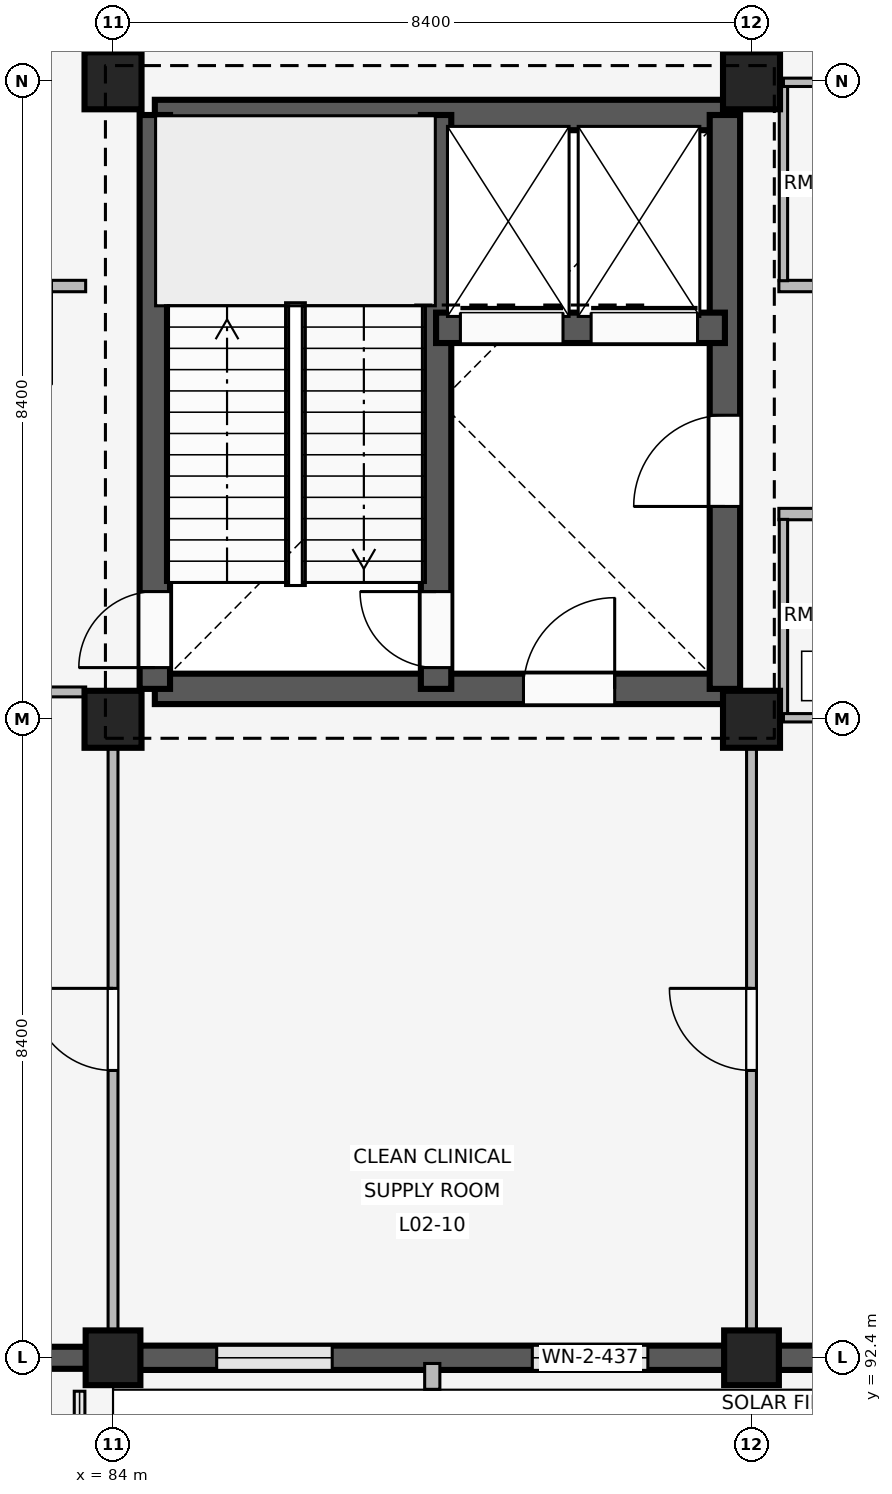
"""IFC4 building model, lengths in metres.
Left out: names, types, materials, properties, quantities, classifications, styles, units other than length and angle.
Written with IfcOpenShell. Run it as: python <this file> out.ifc"""

import sys

from ifc_helpers import new_model, si_unit, direction, frame, frame_2d, origin, origin_2d, place, context, subcontext, project, spatial, rectangle, extrude, element, fill, save


model = new_model("IFC4")
c1 = context("Model", 3, precision=1e-05, world=origin(), true_north=direction((0.0, 1.0)))
c2 = subcontext(c1, "Body", "Model", "MODEL_VIEW")
j1 = project(units=[si_unit("LENGTHUNIT", "METRE"), si_unit("PLANEANGLEUNIT", "RADIAN")], contexts=[c1])
p1 = place(None, origin())
s1 = spatial("IfcSite", under=j1, at=p1, CompositionType="ELEMENT")
p2 = place(p1, origin())
s2 = spatial("IfcBuilding", under=s1, at=p2, CompositionType="ELEMENT")
p3 = place(p2, frame((0.0, 0.0, 8.1)))
s3 = spatial("IfcBuildingStorey", under=s2, at=p3, CompositionType="ELEMENT", Elevation=8.1)
p4 = place(p3, frame((84.0, 92.4, 0.0), z_axis=(0.0, 0.0, 1.0), x_axis=(1.0, 0.0, 0.0)))
e1 = element("IfcColumn", 1, at=p4, inside=s3, PredefinedType="COLUMN", context=c2, shape_type="SweptSolid", body=[
    extrude(rectangle(XDim=0.72, YDim=0.72, at=origin_2d()), origin(), (0.0, 0.0, 1.0), 4.8),
])
for number, where, z_axis, x_axis in (
    (2, (84.0, 100.8, 0.0), (0.0, 0.0, 1.0), (1.0, 0.0, 0.0)),
    (3, (84.0, 109.2, 0.0), (0.0, 0.0, 1.0), (1.0, 0.0, 0.0)),
):
    element("IfcColumn", number, at=place(p3, frame(where, z_axis=z_axis, x_axis=x_axis)), inside=s3, PredefinedType="COLUMN", context=c2, shape_type="SweptSolid", body=[
        extrude(rectangle(XDim=0.75, YDim=0.75, at=origin_2d()), origin(), (0.0, 0.0, 1.0), 4.8),
    ])
p5 = place(p3, frame((92.4, 92.4, 0.0), z_axis=(0.0, 0.0, 1.0), x_axis=(1.0, 0.0, 0.0)))
e4 = element("IfcColumn", 4, at=p5, inside=s3, PredefinedType="COLUMN", context=c2, shape_type="SweptSolid", body=[
    extrude(rectangle(XDim=0.72, YDim=0.72, at=origin_2d()), origin(), (0.0, 0.0, 1.0), 4.8),
])
for number, where, z_axis, x_axis in (
    (5, (92.4, 100.8, 0.0), (0.0, 0.0, 1.0), (1.0, 0.0, 0.0)),
    (6, (92.4, 109.2, 0.0), (0.0, 0.0, 1.0), (1.0, 0.0, 0.0)),
):
    element("IfcColumn", number, at=place(p3, frame(where, z_axis=z_axis, x_axis=x_axis)), inside=s3, PredefinedType="COLUMN", context=c2, shape_type="SweptSolid", body=[
        extrude(rectangle(XDim=0.75, YDim=0.75, at=origin_2d()), origin(), (0.0, 0.0, 1.0), 4.8),
    ])
p6 = place(p3, frame((83.645, 92.4, 0.0), z_axis=(0.0, 0.0, 1.0), x_axis=(-1.0, 0.0, 0.0)))
e7 = element("IfcWall", 7, at=p6, inside=s3, PredefinedType="SOLIDWALL", context=c2, shape_type="SweptSolid", body=[
    extrude(rectangle(XDim=7.69, YDim=0.29, at=frame_2d((3.845, 0.0))), origin(), (0.0, 0.0, 1.0), 3.86),
])
p7 = place(p6, frame((2.895, 0.0, 0.0)))
e8 = element("IfcOpeningElement", 8, at=p7, cuts=e7, PredefinedType="OPENING", context=c2, shape_type="SweptSolid", body=[
    extrude(rectangle(XDim=1.9, YDim=2.4, at=frame_2d((0.95, 1.2))), frame((0.0, 0.155, 0.0), z_axis=(0.0, -1.0, 0.0), x_axis=(1.0, 0.0, 0.0)), (0.0, 0.0, 1.0), 0.31),
])
p8 = place(p3, frame((92.045, 92.4, 0.0), z_axis=(0.0, 0.0, 1.0), x_axis=(-1.0, 0.0, 0.0)))
e9 = element("IfcWall", 9, at=p8, inside=s3, PredefinedType="SOLIDWALL", context=c2, shape_type="SweptSolid", body=[
    extrude(rectangle(XDim=7.69, YDim=0.32, at=frame_2d((3.845, 0.0))), origin(), (0.0, 0.0, 1.0), 3.86),
])
p9 = place(p8, frame((1.009, 0.0, 0.85)))
e10 = element("IfcOpeningElement", 10, at=p9, cuts=e9, PredefinedType="OPENING", context=c2, shape_type="SweptSolid", body=[
    extrude(rectangle(XDim=1.52, YDim=1.65, at=frame_2d((0.76, 0.825))), frame((0.0, 0.17, 0.0), z_axis=(0.0, -1.0, 0.0), x_axis=(1.0, 0.0, 0.0)), (0.0, 0.0, 1.0), 0.34),
])
p10 = place(p8, frame((5.161, 0.0, 0.85)))
e11 = element("IfcOpeningElement", 11, at=p10, cuts=e9, PredefinedType="OPENING", context=c2, shape_type="SweptSolid", body=[
    extrude(rectangle(XDim=1.52, YDim=1.65, at=frame_2d((0.76, 0.825))), frame((0.0, 0.17, 0.0), z_axis=(0.0, -1.0, 0.0), x_axis=(1.0, 0.0, 0.0)), (0.0, 0.0, 1.0), 0.34),
])
p11 = place(p3, frame((88.2, 92.325, 0.0), z_axis=(0.0, 0.0, 1.0), x_axis=(0.0, -1.0, 0.0)))
e12 = element("IfcWall", 12, at=p11, inside=s3, PredefinedType="ELEMENTEDWALL", context=c2, shape_type="SweptSolid", body=[
    extrude(rectangle(XDim=0.34, YDim=0.2, at=frame_2d((0.17, 0.0))), origin(), (0.0, 0.0, 1.0), 3.84),
])
p12 = place(p3, frame((100.445, 92.4, 0.0), z_axis=(0.0, 0.0, 1.0), x_axis=(-1.0, 0.0, 0.0)))
e13 = element("IfcWall", 13, at=p12, inside=s3, PredefinedType="SOLIDWALL", context=c2, shape_type="SweptSolid", body=[
    extrude(rectangle(XDim=7.69, YDim=0.32, at=frame_2d((3.845, 0.0))), origin(), (0.0, 0.0, 1.0), 3.86),
])
p13 = place(p12, frame((1.094, 0.0, 0.85)))
e14 = element("IfcOpeningElement", 14, at=p13, cuts=e13, PredefinedType="OPENING", context=c2, shape_type="SweptSolid", body=[
    extrude(rectangle(XDim=1.35, YDim=1.55, at=frame_2d((0.675, 0.775))), frame((0.0, 0.17, 0.0), z_axis=(0.0, -1.0, 0.0), x_axis=(1.0, 0.0, 0.0)), (0.0, 0.0, 1.0), 0.34),
])
p14 = place(p12, frame((5.246, 0.0, 0.85)))
e15 = element("IfcOpeningElement", 15, at=p14, cuts=e13, PredefinedType="OPENING", context=c2, shape_type="SweptSolid", body=[
    extrude(rectangle(XDim=1.35, YDim=1.55, at=frame_2d((0.675, 0.775))), frame((0.0, 0.17, 0.0), z_axis=(0.0, -1.0, 0.0), x_axis=(1.0, 0.0, 0.0)), (0.0, 0.0, 1.0), 0.34),
])
p15 = place(p3, frame((84.55, 101.2, 0.0), z_axis=(0.0, 0.0, 1.0), x_axis=(1.0, 0.0, 0.0)))
e16 = element("IfcWall", 16, at=p15, inside=s3, PredefinedType="SHEAR", context=c2, shape_type="SweptSolid", body=[
    extrude(rectangle(XDim=7.5, YDim=0.4, at=frame_2d((3.75, 0.0))), origin(), (0.0, 0.0, 1.0), 4.52),
])
p16 = place(p15, frame((4.85, 0.0, 0.0)))
e17 = element("IfcOpeningElement", 17, at=p16, cuts=e16, PredefinedType="OPENING", context=c2, shape_type="SweptSolid", body=[
    extrude(rectangle(XDim=1.2, YDim=2.2, at=frame_2d((0.6, 1.1))), frame((0.0, 0.21, 0.0), z_axis=(0.0, -1.0, 0.0), x_axis=(1.0, 0.0, 0.0)), (0.0, 0.0, 1.0), 0.42),
])
p17 = place(p3, frame((84.55, 108.75, 0.0), z_axis=(0.0, 0.0, 1.0), x_axis=(1.0, 0.0, 0.0)))
e18 = element("IfcWall", 18, at=p17, inside=s3, PredefinedType="SHEAR", context=c2, shape_type="SweptSolid", body=[
    extrude(rectangle(XDim=7.5, YDim=0.4, at=frame_2d((3.75, 0.0))), origin(), (0.0, 0.0, 1.0), 4.52),
])
p18 = place(p3, frame((84.55, 101.2, 0.0), z_axis=(0.0, 0.0, 1.0), x_axis=(0.0, 1.0, 0.0)))
e19 = element("IfcWall", 19, at=p18, inside=s3, PredefinedType="SHEAR", context=c2, shape_type="SweptSolid", body=[
    extrude(rectangle(XDim=7.55, YDim=0.4, at=frame_2d((3.775, 0.0))), origin(), (0.0, 0.0, 1.0), 4.52),
])
p19 = place(p18, frame((0.28, 0.0, 0.0)))
e20 = element("IfcOpeningElement", 20, at=p19, cuts=e19, PredefinedType="OPENING", context=c2, shape_type="SweptSolid", body=[
    extrude(rectangle(XDim=1.0, YDim=2.15, at=frame_2d((0.5, 1.075))), frame((0.0, 0.21, 0.0), z_axis=(0.0, -1.0, 0.0), x_axis=(1.0, 0.0, 0.0)), (0.0, 0.0, 1.0), 0.42),
])
p20 = place(p3, frame((92.05, 101.2, 0.0), z_axis=(0.0, 0.0, 1.0), x_axis=(0.0, 1.0, 0.0)))
e21 = element("IfcWall", 21, at=p20, inside=s3, PredefinedType="SHEAR", context=c2, shape_type="SweptSolid", body=[
    extrude(rectangle(XDim=7.55, YDim=0.4, at=frame_2d((3.775, 0.0))), origin(), (0.0, 0.0, 1.0), 4.52),
])
p21 = place(p20, frame((2.4, 0.0, 0.0)))
e22 = element("IfcOpeningElement", 22, at=p21, cuts=e21, PredefinedType="OPENING", context=c2, shape_type="SweptSolid", body=[
    extrude(rectangle(XDim=1.2, YDim=2.2, at=frame_2d((0.6, 1.1))), frame((0.0, 0.21, 0.0), z_axis=(0.0, -1.0, 0.0), x_axis=(1.0, 0.0, 0.0)), (0.0, 0.0, 1.0), 0.42),
])
p22 = place(p3, frame((88.25, 101.2, 0.0), z_axis=(0.0, 0.0, 1.0), x_axis=(0.0, 1.0, 0.0)))
e23 = element("IfcWall", 23, at=p22, inside=s3, PredefinedType="SHEAR", context=c2, shape_type="SweptSolid", body=[
    extrude(rectangle(XDim=7.55, YDim=0.4, at=frame_2d((3.775, 0.0))), origin(), (0.0, 0.0, 1.0), 4.52),
])
p23 = place(p22, frame((0.28, 0.0, 0.0)))
e24 = element("IfcOpeningElement", 24, at=p23, cuts=e23, PredefinedType="OPENING", context=c2, shape_type="SweptSolid", body=[
    extrude(rectangle(XDim=1.0, YDim=2.15, at=frame_2d((0.5, 1.075))), frame((0.0, 0.21, 0.0), z_axis=(0.0, -1.0, 0.0), x_axis=(1.0, 0.0, 0.0)), (0.0, 0.0, 1.0), 0.42),
])
p24 = place(p3, frame((88.25, 105.95, 0.0), z_axis=(0.0, 0.0, 1.0), x_axis=(1.0, 0.0, 0.0)))
e25 = element("IfcWall", 25, at=p24, inside=s3, PredefinedType="SHEAR", context=c2, shape_type="SweptSolid", body=[
    extrude(rectangle(XDim=3.8, YDim=0.4, at=frame_2d((1.9, 0.0))), origin(), (0.0, 0.0, 1.0), 4.52),
])
p25 = place(p24, frame((0.32, 0.0, 0.0)))
e26 = element("IfcOpeningElement", 26, at=p25, cuts=e25, PredefinedType="OPENING", context=c2, shape_type="SweptSolid", body=[
    extrude(rectangle(XDim=1.35, YDim=2.25, at=frame_2d((0.675, 1.125))), frame((0.0, 0.21, 0.0), z_axis=(0.0, -1.0, 0.0), x_axis=(1.0, 0.0, 0.0)), (0.0, 0.0, 1.0), 0.42),
])
p26 = place(p24, frame((2.04, 0.0, 0.0)))
e27 = element("IfcOpeningElement", 27, at=p26, cuts=e25, PredefinedType="OPENING", context=c2, shape_type="SweptSolid", body=[
    extrude(rectangle(XDim=1.4, YDim=2.25, at=frame_2d((0.7, 1.125))), frame((0.0, 0.21, 0.0), z_axis=(0.0, -1.0, 0.0), x_axis=(1.0, 0.0, 0.0)), (0.0, 0.0, 1.0), 0.42),
])
p27 = place(p3, frame((81.46, 101.16, 0.0), z_axis=(0.0, 0.0, 1.0), x_axis=(1.0, 0.0, 0.0)))
e28 = element("IfcWall", 28, at=p27, inside=s3, PredefinedType="PARTITIONING", context=c2, shape_type="SweptSolid", body=[
    extrude(rectangle(XDim=2.18, YDim=0.13, at=frame_2d((1.09, 0.0))), origin(), (0.0, 0.0, 1.0), 3.84),
])
p28 = place(p3, frame((83.64, 106.5, 0.0), z_axis=(0.0, 0.0, 1.0), x_axis=(-1.0, 0.0, 0.0)))
e29 = element("IfcWall", 29, at=p28, inside=s3, PredefinedType="PARTITIONING", context=c2, shape_type="SweptSolid", body=[
    extrude(rectangle(XDim=7.96, YDim=0.15, at=frame_2d((3.98, 0.0))), origin(), (0.0, 0.0, 1.0), 3.84),
])
p29 = place(p28, frame((0.45, 0.0, 0.0)))
e30 = element("IfcOpeningElement", 30, at=p29, cuts=e29, PredefinedType="OPENING", context=c2, shape_type="SweptSolid", body=[
    extrude(rectangle(XDim=1.3, YDim=2.25, at=frame_2d((0.65, 1.125))), frame((0.0, 0.085, 0.0), z_axis=(0.0, -1.0, 0.0), x_axis=(1.0, 0.0, 0.0)), (0.0, 0.0, 1.0), 0.17),
])
p30 = place(p28, frame((4.15, 0.0, 0.0)))
e31 = element("IfcOpeningElement", 31, at=p30, cuts=e29, PredefinedType="OPENING", context=c2, shape_type="SweptSolid", body=[
    extrude(rectangle(XDim=1.3, YDim=2.25, at=frame_2d((0.65, 1.125))), frame((0.0, 0.085, 0.0), z_axis=(0.0, -1.0, 0.0), x_axis=(1.0, 0.0, 0.0)), (0.0, 0.0, 1.0), 0.17),
])
p31 = place(p3, frame((84.0, 92.54, 0.0), z_axis=(0.0, 0.0, 1.0), x_axis=(0.0, 1.0, 0.0)))
e32 = element("IfcWall", 32, at=p31, inside=s3, PredefinedType="PARTITIONING", context=c2, shape_type="SweptSolid", body=[
    extrude(rectangle(XDim=8.21, YDim=0.13, at=frame_2d((4.105, 0.0))), origin(), (0.0, 0.0, 1.0), 3.84),
])
p32 = place(p31, frame((3.64, 0.0, 0.0)))
e33 = element("IfcOpeningElement", 33, at=p32, cuts=e32, PredefinedType="OPENING", context=c2, shape_type="SweptSolid", body=[
    extrude(rectangle(XDim=1.08, YDim=2.15, at=frame_2d((0.54, 1.075))), frame((0.0, 0.075, 0.0), z_axis=(0.0, -1.0, 0.0), x_axis=(1.0, 0.0, 0.0)), (0.0, 0.0, 1.0), 0.15),
])
p33 = place(p3, frame((84.0, 109.55, 0.0), z_axis=(0.0, 0.0, 1.0), x_axis=(0.0, 1.0, 0.0)))
e34 = element("IfcWall", 34, at=p33, inside=s3, PredefinedType="PARTITIONING", context=c2, shape_type="SweptSolid", body=[
    extrude(rectangle(XDim=7.91, YDim=0.13, at=frame_2d((3.955, 0.0))), origin(), (0.0, 0.0, 1.0), 3.84),
])
p34 = place(p33, frame((3.4, 0.0, 0.0)))
e35 = element("IfcOpeningElement", 35, at=p34, cuts=e34, PredefinedType="OPENING", context=c2, shape_type="SweptSolid", body=[
    extrude(rectangle(XDim=1.05, YDim=2.2, at=frame_2d((0.525, 1.1))), frame((0.0, 0.075, 0.0), z_axis=(0.0, -1.0, 0.0), x_axis=(1.0, 0.0, 0.0)), (0.0, 0.0, 1.0), 0.15),
])
p35 = place(p3, frame((92.4, 92.54, 0.0), z_axis=(0.0, 0.0, 1.0), x_axis=(0.0, 1.0, 0.0)))
e36 = element("IfcWall", 36, at=p35, inside=s3, PredefinedType="PARTITIONING", context=c2, shape_type="SweptSolid", body=[
    extrude(rectangle(XDim=8.21, YDim=0.13, at=frame_2d((4.105, 0.0))), origin(), (0.0, 0.0, 1.0), 3.84),
])
p36 = place(p35, frame((3.64, 0.0, 0.0)))
e37 = element("IfcOpeningElement", 37, at=p36, cuts=e36, PredefinedType="OPENING", context=c2, shape_type="SweptSolid", body=[
    extrude(rectangle(XDim=1.08, YDim=2.15, at=frame_2d((0.54, 1.075))), frame((0.0, 0.075, 0.0), z_axis=(0.0, -1.0, 0.0), x_axis=(1.0, 0.0, 0.0)), (0.0, 0.0, 1.0), 0.15),
])
p37 = place(p3, frame((92.4, 109.55, 0.0), z_axis=(0.0, 0.0, 1.0), x_axis=(0.0, 1.0, 0.0)))
e38 = element("IfcWall", 38, at=p37, inside=s3, PredefinedType="PARTITIONING", context=c2, shape_type="SweptSolid", body=[
    extrude(rectangle(XDim=7.91, YDim=0.13, at=frame_2d((3.955, 0.0))), origin(), (0.0, 0.0, 1.0), 3.84),
])
p38 = place(p37, frame((3.4, 0.0, 0.0)))
e39 = element("IfcOpeningElement", 39, at=p38, cuts=e38, PredefinedType="OPENING", context=c2, shape_type="SweptSolid", body=[
    extrude(rectangle(XDim=1.05, YDim=2.2, at=frame_2d((0.525, 1.1))), frame((0.0, 0.075, 0.0), z_axis=(0.0, -1.0, 0.0), x_axis=(1.0, 0.0, 0.0)), (0.0, 0.0, 1.0), 0.15),
])
p39 = place(p3, frame((92.76, 103.5, 0.0), z_axis=(0.0, 0.0, 1.0), x_axis=(1.0, 0.0, 0.0)))
e40 = element("IfcWall", 40, at=p39, inside=s3, PredefinedType="PARTITIONING", context=c2, shape_type="SweptSolid", body=[
    extrude(rectangle(XDim=7.96, YDim=0.15, at=frame_2d((3.98, 0.0))), origin(), (0.0, 0.0, 1.0), 3.84),
])
p40 = place(p39, frame((2.25, 0.0, 0.0)))
e41 = element("IfcOpeningElement", 41, at=p40, cuts=e40, PredefinedType="OPENING", context=c2, shape_type="SweptSolid", body=[
    extrude(rectangle(XDim=1.3, YDim=2.25, at=frame_2d((0.65, 1.125))), frame((0.0, 0.085, 0.0), z_axis=(0.0, -1.0, 0.0), x_axis=(1.0, 0.0, 0.0)), (0.0, 0.0, 1.0), 0.17),
])
p41 = place(p39, frame((5.95, 0.0, 0.0)))
e42 = element("IfcOpeningElement", 42, at=p41, cuts=e40, PredefinedType="OPENING", context=c2, shape_type="SweptSolid", body=[
    extrude(rectangle(XDim=1.3, YDim=2.25, at=frame_2d((0.65, 1.125))), frame((0.0, 0.085, 0.0), z_axis=(0.0, -1.0, 0.0), x_axis=(1.0, 0.0, 0.0)), (0.0, 0.0, 1.0), 0.17),
])
p42 = place(p3, frame((92.82, 100.82, 0.0), z_axis=(0.0, 0.0, 1.0), x_axis=(0.0, 1.0, 0.0)))
e43 = element("IfcWall", 43, at=p42, inside=s3, PredefinedType="PARTITIONING", context=c2, shape_type="SweptSolid", body=[
    extrude(rectangle(XDim=2.61, YDim=0.11, at=frame_2d((1.305, 0.0))), origin(), (0.0, 0.0, 1.0), 3.84),
])
p43 = place(p3, frame((92.82, 100.82, 0.0), z_axis=(0.0, 0.0, 1.0), x_axis=(1.0, 0.0, 0.0)))
e44 = element("IfcWall", 44, at=p43, inside=s3, PredefinedType="PARTITIONING", context=c2, shape_type="SweptSolid", body=[
    extrude(rectangle(XDim=1.98, YDim=0.11, at=frame_2d((0.99, 0.0))), origin(), (0.0, 0.0, 1.0), 3.84),
])
p44 = place(p43, frame((0.54, 0.0, 0.0)))
e45 = element("IfcOpeningElement", 45, at=p44, cuts=e44, PredefinedType="OPENING", context=c2, shape_type="SweptSolid", body=[
    extrude(rectangle(XDim=0.9, YDim=2.1, at=frame_2d((0.45, 1.05))), frame((0.0, 0.065, 0.0), z_axis=(0.0, -1.0, 0.0), x_axis=(1.0, 0.0, 0.0)), (0.0, 0.0, 1.0), 0.13),
])
p45 = place(p3, frame((100.72, 106.5, 0.0), z_axis=(0.0, 0.0, 1.0), x_axis=(-1.0, 0.0, 0.0)))
e46 = element("IfcWall", 46, at=p45, inside=s3, PredefinedType="PARTITIONING", context=c2, shape_type="SweptSolid", body=[
    extrude(rectangle(XDim=7.96, YDim=0.15, at=frame_2d((3.98, 0.0))), origin(), (0.0, 0.0, 1.0), 3.84),
])
p46 = place(p45, frame((0.73, 0.0, 0.0)))
e47 = element("IfcOpeningElement", 47, at=p46, cuts=e46, PredefinedType="OPENING", context=c2, shape_type="SweptSolid", body=[
    extrude(rectangle(XDim=1.3, YDim=2.25, at=frame_2d((0.65, 1.125))), frame((0.0, 0.085, 0.0), z_axis=(0.0, -1.0, 0.0), x_axis=(1.0, 0.0, 0.0)), (0.0, 0.0, 1.0), 0.17),
])
p47 = place(p45, frame((4.43, 0.0, 0.0)))
e48 = element("IfcOpeningElement", 48, at=p47, cuts=e46, PredefinedType="OPENING", context=c2, shape_type="SweptSolid", body=[
    extrude(rectangle(XDim=1.3, YDim=2.25, at=frame_2d((0.65, 1.125))), frame((0.0, 0.085, 0.0), z_axis=(0.0, -1.0, 0.0), x_axis=(1.0, 0.0, 0.0)), (0.0, 0.0, 1.0), 0.17),
])
p48 = place(p3, frame((92.82, 106.57, 0.0), z_axis=(0.0, 0.0, 1.0), x_axis=(0.0, 1.0, 0.0)))
e49 = element("IfcWall", 49, at=p48, inside=s3, PredefinedType="PARTITIONING", context=c2, shape_type="SweptSolid", body=[
    extrude(rectangle(XDim=2.61, YDim=0.11, at=frame_2d((1.305, 0.0))), origin(), (0.0, 0.0, 1.0), 3.84),
])
p49 = place(p3, frame((92.82, 109.18, 0.0), z_axis=(0.0, 0.0, 1.0), x_axis=(1.0, 0.0, 0.0)))
e50 = element("IfcWall", 50, at=p49, inside=s3, PredefinedType="PARTITIONING", context=c2, shape_type="SweptSolid", body=[
    extrude(rectangle(XDim=1.98, YDim=0.11, at=frame_2d((0.99, 0.0))), origin(), (0.0, 0.0, 1.0), 3.84),
])
p50 = place(p49, frame((0.54, 0.0, 0.0)))
e51 = element("IfcOpeningElement", 51, at=p50, cuts=e50, PredefinedType="OPENING", context=c2, shape_type="SweptSolid", body=[
    extrude(rectangle(XDim=0.9, YDim=2.1, at=frame_2d((0.45, 1.05))), frame((0.0, 0.065, 0.0), z_axis=(0.0, -1.0, 0.0), x_axis=(1.0, 0.0, 0.0)), (0.0, 0.0, 1.0), 0.13),
])
p51 = place(p9, origin())
e52 = element("IfcWindow", 52, at=p51, inside=s3, PartitioningType="SINGLE_PANEL", PredefinedType="WINDOW", context=c2, shape_type="SweptSolid", body=[
    extrude(rectangle(XDim=1.52, YDim=1.65, at=frame_2d((0.76, 0.825))), frame((0.0, 0.03, 0.0), z_axis=(0.0, -1.0, 0.0), x_axis=(1.0, 0.0, 0.0)), (0.0, 0.0, 1.0), 0.06),
])
fill(e10, e52)
p52 = place(p10, origin())
e53 = element("IfcWindow", 53, at=p52, inside=s3, PartitioningType="SINGLE_PANEL", PredefinedType="WINDOW", context=c2, shape_type="SweptSolid", body=[
    extrude(rectangle(XDim=1.52, YDim=1.65, at=frame_2d((0.76, 0.825))), frame((0.0, 0.03, 0.0), z_axis=(0.0, -1.0, 0.0), x_axis=(1.0, 0.0, 0.0)), (0.0, 0.0, 1.0), 0.06),
])
fill(e11, e53)
p53 = place(p21, origin())
e54 = element("IfcDoor", 54, at=p53, inside=s3, OperationType="SINGLE_SWING_LEFT", PredefinedType="DOOR", context=c2, shape_type="SweptSolid", body=[
    extrude(rectangle(XDim=1.2, YDim=2.2, at=frame_2d((0.6, 1.1))), frame((0.0, 0.025, 0.0), z_axis=(0.0, -1.0, 0.0), x_axis=(1.0, 0.0, 0.0)), (0.0, 0.0, 1.0), 0.05),
])
fill(e22, e54)
p54 = place(p16, origin())
e55 = element("IfcDoor", 55, at=p54, inside=s3, OperationType="SINGLE_SWING_RIGHT", PredefinedType="DOOR", context=c2, shape_type="SweptSolid", body=[
    extrude(rectangle(XDim=1.2, YDim=2.2, at=frame_2d((0.6, 1.1))), frame((0.0, 0.025, 0.0), z_axis=(0.0, -1.0, 0.0), x_axis=(1.0, 0.0, 0.0)), (0.0, 0.0, 1.0), 0.05),
])
fill(e17, e55)
p55 = place(p19, origin())
e56 = element("IfcDoor", 56, at=p55, inside=s3, OperationType="SINGLE_SWING_LEFT", PredefinedType="DOOR", context=c2, shape_type="SweptSolid", body=[
    extrude(rectangle(XDim=1.0, YDim=2.15, at=frame_2d((0.5, 1.075))), frame((0.0, 0.025, 0.0), z_axis=(0.0, -1.0, 0.0), x_axis=(1.0, 0.0, 0.0)), (0.0, 0.0, 1.0), 0.05),
])
fill(e20, e56)
p56 = place(p23, origin())
e57 = element("IfcDoor", 57, at=p56, inside=s3, OperationType="SINGLE_SWING_RIGHT", PredefinedType="DOOR", context=c2, shape_type="SweptSolid", body=[
    extrude(rectangle(XDim=1.0, YDim=2.15, at=frame_2d((0.5, 1.075))), frame((0.0, 0.025, 0.0), z_axis=(0.0, -1.0, 0.0), x_axis=(1.0, 0.0, 0.0)), (0.0, 0.0, 1.0), 0.05),
])
fill(e24, e57)
p57 = place(p25, origin())
e58 = element("IfcDoor", 58, at=p57, inside=s3, OperationType="SLIDING_TO_LEFT", PredefinedType="DOOR", context=c2, shape_type="SweptSolid", body=[
    extrude(rectangle(XDim=1.35, YDim=2.25, at=frame_2d((0.675, 1.125))), frame((0.0, 0.025, 0.0), z_axis=(0.0, -1.0, 0.0), x_axis=(1.0, 0.0, 0.0)), (0.0, 0.0, 1.0), 0.05),
])
fill(e26, e58)
p58 = place(p26, origin())
e59 = element("IfcDoor", 59, at=p58, inside=s3, OperationType="SLIDING_TO_LEFT", PredefinedType="DOOR", context=c2, shape_type="SweptSolid", body=[
    extrude(rectangle(XDim=1.4, YDim=2.25, at=frame_2d((0.7, 1.125))), frame((0.0, 0.025, 0.0), z_axis=(0.0, -1.0, 0.0), x_axis=(1.0, 0.0, 0.0)), (0.0, 0.0, 1.0), 0.05),
])
fill(e27, e59)
p59 = place(p32, origin())
e60 = element("IfcDoor", 60, at=p59, inside=s3, OperationType="SINGLE_SWING_RIGHT", PredefinedType="DOOR", context=c2, shape_type="SweptSolid", body=[
    extrude(rectangle(XDim=1.08, YDim=2.15, at=frame_2d((0.54, 1.075))), frame((0.0, 0.025, 0.0), z_axis=(0.0, -1.0, 0.0), x_axis=(1.0, 0.0, 0.0)), (0.0, 0.0, 1.0), 0.05),
])
fill(e33, e60)
p60 = place(p36, origin())
e61 = element("IfcDoor", 61, at=p60, inside=s3, OperationType="SINGLE_SWING_RIGHT", PredefinedType="DOOR", context=c2, shape_type="SweptSolid", body=[
    extrude(rectangle(XDim=1.08, YDim=2.15, at=frame_2d((0.54, 1.075))), frame((0.0, 0.025, 0.0), z_axis=(0.0, -1.0, 0.0), x_axis=(1.0, 0.0, 0.0)), (0.0, 0.0, 1.0), 0.05),
])
fill(e37, e61)
save(model, sys.argv[1])
